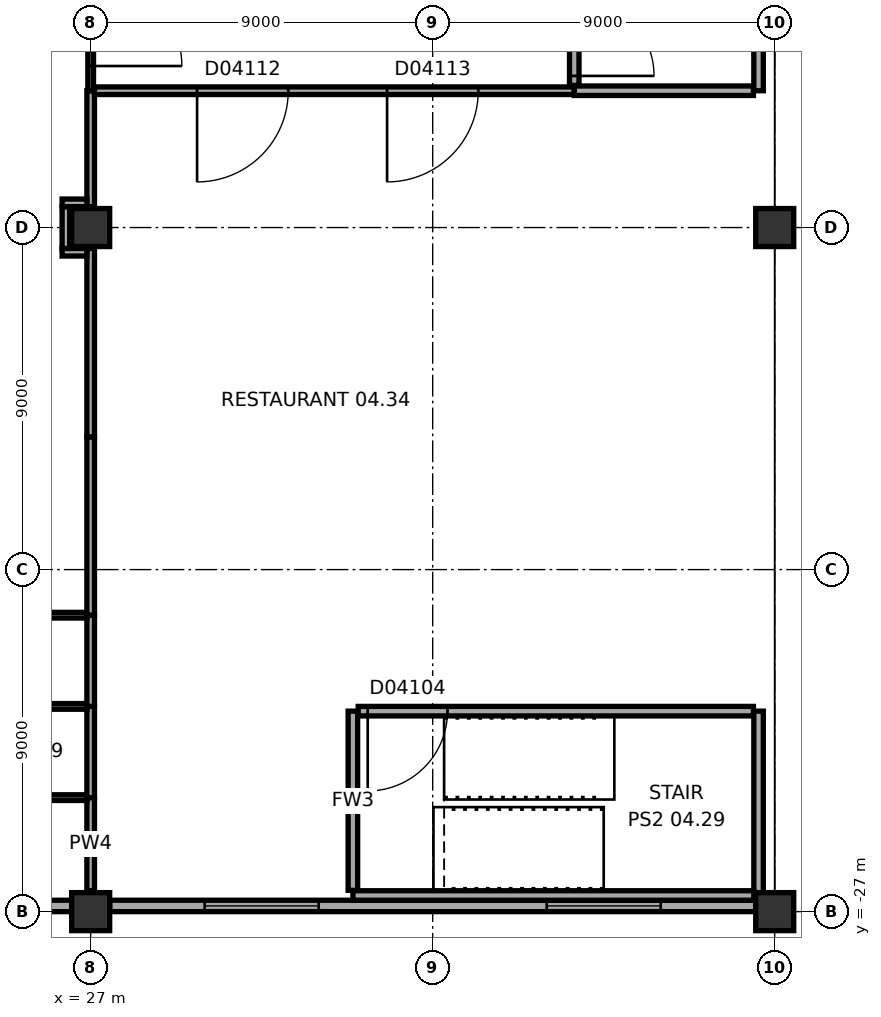
"""IFC4 building model, lengths in metres.
Left out: names, types, materials, properties, quantities, classifications, styles, units other than length and angle.
Written with IfcOpenShell. Run it as: python <this file> out.ifc"""

import sys

from ifc_helpers import new_model, si_unit, direction, frame, frame_2d, origin, origin_2d, place, context, subcontext, project, spatial, rectangle, extrude, element, fill, save


model = new_model("IFC4")
c1 = context("Model", 3, precision=1e-05, world=origin(), true_north=direction((0.0, 1.0)))
c2 = subcontext(c1, "Body", "Model", "MODEL_VIEW")
j1 = project(units=[si_unit("LENGTHUNIT", "METRE"), si_unit("PLANEANGLEUNIT", "RADIAN")], contexts=[c1])
p1 = place(None, origin())
s1 = spatial("IfcSite", under=j1, at=p1, CompositionType="ELEMENT")
p2 = place(p1, origin())
s2 = spatial("IfcBuilding", under=s1, at=p2, CompositionType="ELEMENT")
p3 = place(p2, frame((0.0, 0.0, 29.0)))
s3 = spatial("IfcBuildingStorey", under=s2, at=p3, CompositionType="ELEMENT", Elevation=29.0)
for number, where, z_axis, x_axis in (
    (1, (27.0, -27.0, 0.0), (0.0, 0.0, 1.0), (1.0, 0.0, 0.0)),
    (2, (27.0, -9.0, 0.0), (0.0, 0.0, 1.0), (1.0, 0.0, 0.0)),
    (3, (45.0, -27.0, 0.0), (0.0, 0.0, 1.0), (1.0, 0.0, 0.0)),
    (4, (45.0, -9.0, 0.0), (0.0, 0.0, 1.0), (1.0, 0.0, 0.0)),
):
    element("IfcColumn", number, at=place(p3, frame(where, z_axis=z_axis, x_axis=x_axis)), inside=s3, PredefinedType="COLUMN", context=c2, shape_type="SweptSolid", body=[
        extrude(rectangle(XDim=1.0, YDim=1.0, at=origin_2d()), origin(), (0.0, 0.0, 1.0), 5.5),
    ])
p4 = place(p3, frame((9.5, -26.85, 0.0), z_axis=(0.0, 0.0, 1.0), x_axis=(1.0, 0.0, 0.0)))
e5 = element("IfcWall", 5, at=p4, inside=s3, PredefinedType="STANDARD", context=c2, shape_type="SweptSolid", body=[
    extrude(rectangle(XDim=17.0, YDim=0.3, at=frame_2d((8.5, 0.0))), origin(), (0.0, 0.0, 1.0), 3.95),
])
p5 = place(p4, frame((2.5, 0.0, 1.0)))
e6 = element("IfcOpeningElement", 6, at=p5, cuts=e5, PredefinedType="OPENING", context=c2, shape_type="SweptSolid", body=[
    extrude(rectangle(XDim=3.0, YDim=2.6, at=frame_2d((1.5, 1.3))), frame((0.0, 0.16, 0.0), z_axis=(0.0, -1.0, 0.0), x_axis=(1.0, 0.0, 0.0)), (0.0, 0.0, 1.0), 0.32),
])
p6 = place(p4, frame((11.5, 0.0, 1.0)))
e7 = element("IfcOpeningElement", 7, at=p6, cuts=e5, PredefinedType="OPENING", context=c2, shape_type="SweptSolid", body=[
    extrude(rectangle(XDim=3.0, YDim=2.6, at=frame_2d((1.5, 1.3))), frame((0.0, 0.16, 0.0), z_axis=(0.0, -1.0, 0.0), x_axis=(1.0, 0.0, 0.0)), (0.0, 0.0, 1.0), 0.32),
])
p7 = place(p3, frame((27.5, -26.85, 0.0), z_axis=(0.0, 0.0, 1.0), x_axis=(1.0, 0.0, 0.0)))
e8 = element("IfcWall", 8, at=p7, inside=s3, PredefinedType="STANDARD", context=c2, shape_type="SweptSolid", body=[
    extrude(rectangle(XDim=17.0, YDim=0.3, at=frame_2d((8.5, 0.0))), origin(), (0.0, 0.0, 1.0), 3.95),
])
p8 = place(p7, frame((2.5, 0.0, 1.0)))
e9 = element("IfcOpeningElement", 9, at=p8, cuts=e8, PredefinedType="OPENING", context=c2, shape_type="SweptSolid", body=[
    extrude(rectangle(XDim=3.0, YDim=2.6, at=frame_2d((1.5, 1.3))), frame((0.0, 0.16, 0.0), z_axis=(0.0, -1.0, 0.0), x_axis=(1.0, 0.0, 0.0)), (0.0, 0.0, 1.0), 0.32),
])
p9 = place(p7, frame((11.5, 0.0, 1.0)))
e10 = element("IfcOpeningElement", 10, at=p9, cuts=e8, PredefinedType="OPENING", context=c2, shape_type="SweptSolid", body=[
    extrude(rectangle(XDim=3.0, YDim=2.6, at=frame_2d((1.5, 1.3))), frame((0.0, 0.16, 0.0), z_axis=(0.0, -1.0, 0.0), x_axis=(1.0, 0.0, 0.0)), (0.0, 0.0, 1.0), 0.32),
])
p10 = place(p3, frame((27.0, -26.45, 0.0), z_axis=(0.0, 0.0, 1.0), x_axis=(0.0, 1.0, 0.0)))
e11 = element("IfcWall", 11, at=p10, inside=s3, PredefinedType="PARTITIONING", context=c2, shape_type="SweptSolid", body=[
    extrude(rectangle(XDim=2.45, YDim=0.2, at=frame_2d((1.225, 0.0))), origin(), (0.0, 0.0, 1.0), 3.95),
])
p11 = place(p3, frame((33.9, -26.44, 0.0), z_axis=(0.0, 0.0, 1.0), x_axis=(0.0, 1.0, 0.0)))
e12 = element("IfcWall", 12, at=p11, inside=s3, PredefinedType="SOLIDWALL", context=c2, shape_type="SweptSolid", body=[
    extrude(rectangle(XDim=4.715, YDim=0.25, at=frame_2d((2.357, 0.0))), origin(), (0.0, 0.0, 1.0), 5.15),
])
p12 = place(p3, frame((20.08, -24.0, 0.0), z_axis=(0.0, 0.0, 1.0), x_axis=(1.0, 0.0, 0.0)))
e13 = element("IfcWall", 13, at=p12, inside=s3, PredefinedType="PARTITIONING", context=c2, shape_type="SweptSolid", body=[
    extrude(rectangle(XDim=6.82, YDim=0.15, at=frame_2d((3.41, 0.0))), origin(), (0.0, 0.0, 1.0), 5.15),
])
p13 = place(p3, frame((27.0, -24.0, 0.0), z_axis=(0.0, 0.0, 1.0), x_axis=(0.0, 1.0, 0.0)))
e14 = element("IfcWall", 14, at=p13, inside=s3, PredefinedType="PARTITIONING", context=c2, shape_type="SweptSolid", body=[
    extrude(rectangle(XDim=2.4, YDim=0.2, at=frame_2d((1.2, 0.0))), origin(), (0.0, 0.0, 1.0), 3.95),
])
p14 = place(p3, frame((34.04, -21.725, 0.0), z_axis=(0.0, 0.0, 1.0), x_axis=(1.0, 0.0, 0.0)))
e15 = element("IfcWall", 15, at=p14, inside=s3, PredefinedType="SOLIDWALL", context=c2, shape_type="SweptSolid", body=[
    extrude(rectangle(XDim=10.4, YDim=0.25, at=frame_2d((5.2, 0.0))), origin(), (0.0, 0.0, 1.0), 5.15),
])
p15 = place(p14, frame((0.25, 0.0, 0.0)))
e16 = element("IfcOpeningElement", 16, at=p15, cuts=e15, PredefinedType="OPENING", context=c2, shape_type="SweptSolid", body=[
    extrude(rectangle(XDim=2.1, YDim=2.4, at=frame_2d((1.05, 1.2))), frame((0.0, 0.135, 0.0), z_axis=(0.0, -1.0, 0.0), x_axis=(1.0, 0.0, 0.0)), (0.0, 0.0, 1.0), 0.27),
])
p16 = place(p3, frame((20.08, -21.6, 0.0), z_axis=(0.0, 0.0, 1.0), x_axis=(1.0, 0.0, 0.0)))
e17 = element("IfcWall", 17, at=p16, inside=s3, PredefinedType="PARTITIONING", context=c2, shape_type="SweptSolid", body=[
    extrude(rectangle(XDim=6.82, YDim=0.15, at=frame_2d((3.41, 0.0))), origin(), (0.0, 0.0, 1.0), 5.15),
])
p17 = place(p3, frame((27.0, -21.6, 0.0), z_axis=(0.0, 0.0, 1.0), x_axis=(0.0, 1.0, 0.0)))
e18 = element("IfcWall", 18, at=p17, inside=s3, PredefinedType="PARTITIONING", context=c2, shape_type="SweptSolid", body=[
    extrude(rectangle(XDim=2.4, YDim=0.2, at=frame_2d((1.2, 0.0))), origin(), (0.0, 0.0, 1.0), 3.95),
])
p18 = place(p3, frame((20.08, -19.2, 0.0), z_axis=(0.0, 0.0, 1.0), x_axis=(1.0, 0.0, 0.0)))
e19 = element("IfcWall", 19, at=p18, inside=s3, PredefinedType="PARTITIONING", context=c2, shape_type="SweptSolid", body=[
    extrude(rectangle(XDim=6.82, YDim=0.15, at=frame_2d((3.41, 0.0))), origin(), (0.0, 0.0, 1.0), 5.15),
])
p19 = place(p3, frame((27.0, -19.2, 0.0), z_axis=(0.0, 0.0, 1.0), x_axis=(0.0, 1.0, 0.0)))
e20 = element("IfcWall", 20, at=p19, inside=s3, PredefinedType="PARTITIONING", context=c2, shape_type="SweptSolid", body=[
    extrude(rectangle(XDim=4.692, YDim=0.2, at=frame_2d((2.346, 0.0))), origin(), (0.0, 0.0, 1.0), 3.95),
])
p20 = place(p3, frame((27.0, -14.508, 0.0), z_axis=(0.0, 0.0, 1.0), x_axis=(0.0, 1.0, 0.0)))
e21 = element("IfcWall", 21, at=p20, inside=s3, PredefinedType="PARTITIONING", context=c2, shape_type="SweptSolid", body=[
    extrude(rectangle(XDim=4.958, YDim=0.2, at=frame_2d((2.479, 0.0))), origin(), (0.0, 0.0, 1.0), 3.95),
])
p21 = place(p3, frame((26.9, -9.65, 0.0), z_axis=(0.0, 0.0, 1.0), x_axis=(-1.0, 0.0, 0.0)))
e22 = element("IfcWall", 22, at=p21, inside=s3, PredefinedType="PARTITIONING", context=c2, shape_type="SweptSolid", body=[
    extrude(rectangle(XDim=0.652, YDim=0.2, at=frame_2d((0.326, 0.0))), origin(), (0.0, 0.0, 1.0), 5.15),
])
p22 = place(p3, frame((26.348, -9.55, 0.0), z_axis=(0.0, 0.0, 1.0), x_axis=(0.0, 1.0, 0.0)))
e23 = element("IfcWall", 23, at=p22, inside=s3, PredefinedType="PARTITIONING", context=c2, shape_type="SweptSolid", body=[
    extrude(rectangle(XDim=1.1, YDim=0.2, at=frame_2d((0.55, 0.0))), origin(), (0.0, 0.0, 1.0), 5.15),
])
p23 = place(p3, frame((27.0, -8.45, 0.0), z_axis=(0.0, 0.0, 1.0), x_axis=(0.0, 1.0, 0.0)))
e24 = element("IfcWall", 24, at=p23, inside=s3, PredefinedType="PARTITIONING", context=c2, shape_type="SweptSolid", body=[
    extrude(rectangle(XDim=3.05, YDim=0.2, at=frame_2d((1.525, 0.0))), origin(), (0.0, 0.0, 1.0), 3.95),
])
p24 = place(p3, frame((26.9, -8.35, 0.0), z_axis=(0.0, 0.0, 1.0), x_axis=(-1.0, 0.0, 0.0)))
e25 = element("IfcWall", 25, at=p24, inside=s3, PredefinedType="PARTITIONING", context=c2, shape_type="SweptSolid", body=[
    extrude(rectangle(XDim=0.652, YDim=0.2, at=frame_2d((0.326, 0.0))), origin(), (0.0, 0.0, 1.0), 5.15),
])
p25 = place(p3, frame((27.0, -5.4, 0.0), z_axis=(0.0, 0.0, 1.0), x_axis=(0.0, 1.0, 0.0)))
e26 = element("IfcWall", 26, at=p25, inside=s3, PredefinedType="PARTITIONING", context=c2, shape_type="SweptSolid", body=[
    extrude(rectangle(XDim=6.547, YDim=0.15, at=frame_2d((3.274, 0.0))), origin(), (0.0, 0.0, 1.0), 3.95),
])
p26 = place(p25, frame((0.65, 0.0, 0.0)))
e27 = element("IfcOpeningElement", 27, at=p26, cuts=e26, PredefinedType="OPENING", context=c2, shape_type="SweptSolid", body=[
    extrude(rectangle(XDim=2.4, YDim=2.4, at=frame_2d((1.2, 1.2))), frame((0.0, 0.085, 0.0), z_axis=(0.0, -1.0, 0.0), x_axis=(1.0, 0.0, 0.0)), (0.0, 0.0, 1.0), 0.17),
])
p27 = place(p3, frame((27.1, -5.4, 0.0), z_axis=(0.0, 0.0, 1.0), x_axis=(1.0, 0.0, 0.0)))
e28 = element("IfcWall", 28, at=p27, inside=s3, PredefinedType="PARTITIONING", context=c2, shape_type="SweptSolid", body=[
    extrude(rectangle(XDim=12.625, YDim=0.2, at=frame_2d((6.312, 0.0))), origin(), (0.0, 0.0, 1.0), 5.15),
])
p28 = place(p27, frame((2.7, 0.0, 0.0)))
e29 = element("IfcOpeningElement", 29, at=p28, cuts=e28, PredefinedType="OPENING", context=c2, shape_type="SweptSolid", body=[
    extrude(rectangle(XDim=2.4, YDim=2.4, at=frame_2d((1.2, 1.2))), frame((0.0, 0.11, 0.0), z_axis=(0.0, -1.0, 0.0), x_axis=(1.0, 0.0, 0.0)), (0.0, 0.0, 1.0), 0.22),
])
p29 = place(p27, frame((7.7, 0.0, 0.0)))
e30 = element("IfcOpeningElement", 30, at=p29, cuts=e28, PredefinedType="OPENING", context=c2, shape_type="SweptSolid", body=[
    extrude(rectangle(XDim=2.4, YDim=2.4, at=frame_2d((1.2, 1.2))), frame((0.0, 0.11, 0.0), z_axis=(0.0, -1.0, 0.0), x_axis=(1.0, 0.0, 0.0)), (0.0, 0.0, 1.0), 0.22),
])
p30 = place(p3, frame((44.44, -5.4, 0.0), z_axis=(0.0, 0.0, 1.0), x_axis=(-1.0, 0.0, 0.0)))
e31 = element("IfcWall", 31, at=p30, inside=s3, PredefinedType="SOLIDWALL", context=c2, shape_type="SweptSolid", body=[
    extrude(rectangle(XDim=4.715, YDim=0.25, at=frame_2d((2.357, 0.0))), origin(), (0.0, 0.0, 1.0), 5.15),
])
p31 = place(p3, frame((39.725, -5.26, 0.0), z_axis=(0.0, 0.0, 1.0), x_axis=(0.0, 1.0, 0.0)))
e32 = element("IfcWall", 32, at=p31, inside=s3, PredefinedType="SOLIDWALL", context=c2, shape_type="SweptSolid", body=[
    extrude(rectangle(XDim=10.52, YDim=0.25, at=frame_2d((5.26, 0.0))), origin(), (0.0, 0.0, 1.0), 5.15),
])
p32 = place(p31, frame((0.25, 0.0, 0.0)))
e33 = element("IfcOpeningElement", 33, at=p32, cuts=e32, PredefinedType="OPENING", context=c2, shape_type="SweptSolid", body=[
    extrude(rectangle(XDim=2.1, YDim=2.4, at=frame_2d((1.05, 1.2))), frame((0.0, 0.135, 0.0), z_axis=(0.0, -1.0, 0.0), x_axis=(1.0, 0.0, 0.0)), (0.0, 0.0, 1.0), 0.27),
])
p33 = place(p3, frame((44.575, -21.725, 0.0), z_axis=(0.0, 0.0, 1.0), x_axis=(0.0, -1.0, 0.0)))
e34 = element("IfcWall", 34, at=p33, inside=s3, PredefinedType="SOLIDWALL", context=c2, shape_type="SweptSolid", body=[
    extrude(rectangle(XDim=4.975, YDim=0.25, at=frame_2d((2.487, 0.0))), origin(), (0.0, 0.0, 1.0), 5.15),
])
p34 = place(p3, frame((44.45, -26.575, 0.0), z_axis=(0.0, 0.0, 1.0), x_axis=(-1.0, 0.0, 0.0)))
e35 = element("IfcWall", 35, at=p34, inside=s3, PredefinedType="SOLIDWALL", context=c2, shape_type="SweptSolid", body=[
    extrude(rectangle(XDim=10.55, YDim=0.25, at=frame_2d((5.275, 0.0))), origin(), (0.0, 0.0, 1.0), 5.15),
])
p35 = place(p3, frame((44.575, 5.4, 0.0), z_axis=(0.0, 0.0, 1.0), x_axis=(0.0, -1.0, 0.0)))
e36 = element("IfcWall", 36, at=p35, inside=s3, PredefinedType="SOLIDWALL", context=c2, shape_type="SweptSolid", body=[
    extrude(rectangle(XDim=10.8, YDim=0.25, at=frame_2d((5.4, 0.0))), origin(), (0.0, 0.0, 1.0), 5.15),
])
p36 = place(p8, origin())
e37 = element("IfcWindow", 37, at=p36, inside=s3, PartitioningType="SINGLE_PANEL", PredefinedType="WINDOW", context=c2, shape_type="SweptSolid", body=[
    extrude(rectangle(XDim=3.0, YDim=2.6, at=frame_2d((1.5, 1.3))), frame((0.0, 0.03, 0.0), z_axis=(0.0, -1.0, 0.0), x_axis=(1.0, 0.0, 0.0)), (0.0, 0.0, 1.0), 0.06),
])
fill(e9, e37)
p37 = place(p9, origin())
e38 = element("IfcWindow", 38, at=p37, inside=s3, PartitioningType="SINGLE_PANEL", PredefinedType="WINDOW", context=c2, shape_type="SweptSolid", body=[
    extrude(rectangle(XDim=3.0, YDim=2.6, at=frame_2d((1.5, 1.3))), frame((0.0, 0.03, 0.0), z_axis=(0.0, -1.0, 0.0), x_axis=(1.0, 0.0, 0.0)), (0.0, 0.0, 1.0), 0.06),
])
fill(e10, e38)
p38 = place(p15, frame((2.1, 0.0, 0.0), z_axis=(0.0, 0.0, 1.0), x_axis=(-1.0, 0.0, 0.0)))
e39 = element("IfcDoor", 39, at=p38, inside=s3, OperationType="DOUBLE_DOOR_SINGLE_SWING", PredefinedType="DOOR", context=c2, shape_type="SweptSolid", body=[
    extrude(rectangle(XDim=2.1, YDim=2.4, at=frame_2d((1.05, 1.2))), frame((0.0, 0.025, 0.0), z_axis=(0.0, -1.0, 0.0), x_axis=(1.0, 0.0, 0.0)), (0.0, 0.0, 1.0), 0.05),
])
fill(e16, e39)
p39 = place(p26, origin())
e40 = element("IfcDoor", 40, at=p39, inside=s3, OperationType="DOUBLE_DOOR_SINGLE_SWING", PredefinedType="DOOR", context=c2, shape_type="SweptSolid", body=[
    extrude(rectangle(XDim=2.4, YDim=2.4, at=frame_2d((1.2, 1.2))), frame((0.0, 0.025, 0.0), z_axis=(0.0, -1.0, 0.0), x_axis=(1.0, 0.0, 0.0)), (0.0, 0.0, 1.0), 0.05),
])
fill(e27, e40)
p40 = place(p28, origin())
e41 = element("IfcDoor", 41, at=p40, inside=s3, OperationType="DOUBLE_DOOR_SINGLE_SWING", PredefinedType="DOOR", context=c2, shape_type="SweptSolid", body=[
    extrude(rectangle(XDim=2.4, YDim=2.4, at=frame_2d((1.2, 1.2))), frame((0.0, 0.025, 0.0), z_axis=(0.0, -1.0, 0.0), x_axis=(1.0, 0.0, 0.0)), (0.0, 0.0, 1.0), 0.05),
])
fill(e29, e41)
p41 = place(p29, origin())
e42 = element("IfcDoor", 42, at=p41, inside=s3, OperationType="DOUBLE_DOOR_SINGLE_SWING", PredefinedType="DOOR", context=c2, shape_type="SweptSolid", body=[
    extrude(rectangle(XDim=2.4, YDim=2.4, at=frame_2d((1.2, 1.2))), frame((0.0, 0.025, 0.0), z_axis=(0.0, -1.0, 0.0), x_axis=(1.0, 0.0, 0.0)), (0.0, 0.0, 1.0), 0.05),
])
fill(e30, e42)
p42 = place(p32, frame((2.1, 0.0, 0.0), z_axis=(0.0, 0.0, 1.0), x_axis=(-1.0, 0.0, 0.0)))
e43 = element("IfcDoor", 43, at=p42, inside=s3, OperationType="DOUBLE_DOOR_SINGLE_SWING", PredefinedType="DOOR", context=c2, shape_type="SweptSolid", body=[
    extrude(rectangle(XDim=2.1, YDim=2.4, at=frame_2d((1.05, 1.2))), frame((0.0, 0.025, 0.0), z_axis=(0.0, -1.0, 0.0), x_axis=(1.0, 0.0, 0.0)), (0.0, 0.0, 1.0), 0.05),
])
fill(e33, e43)
save(model, sys.argv[1])
